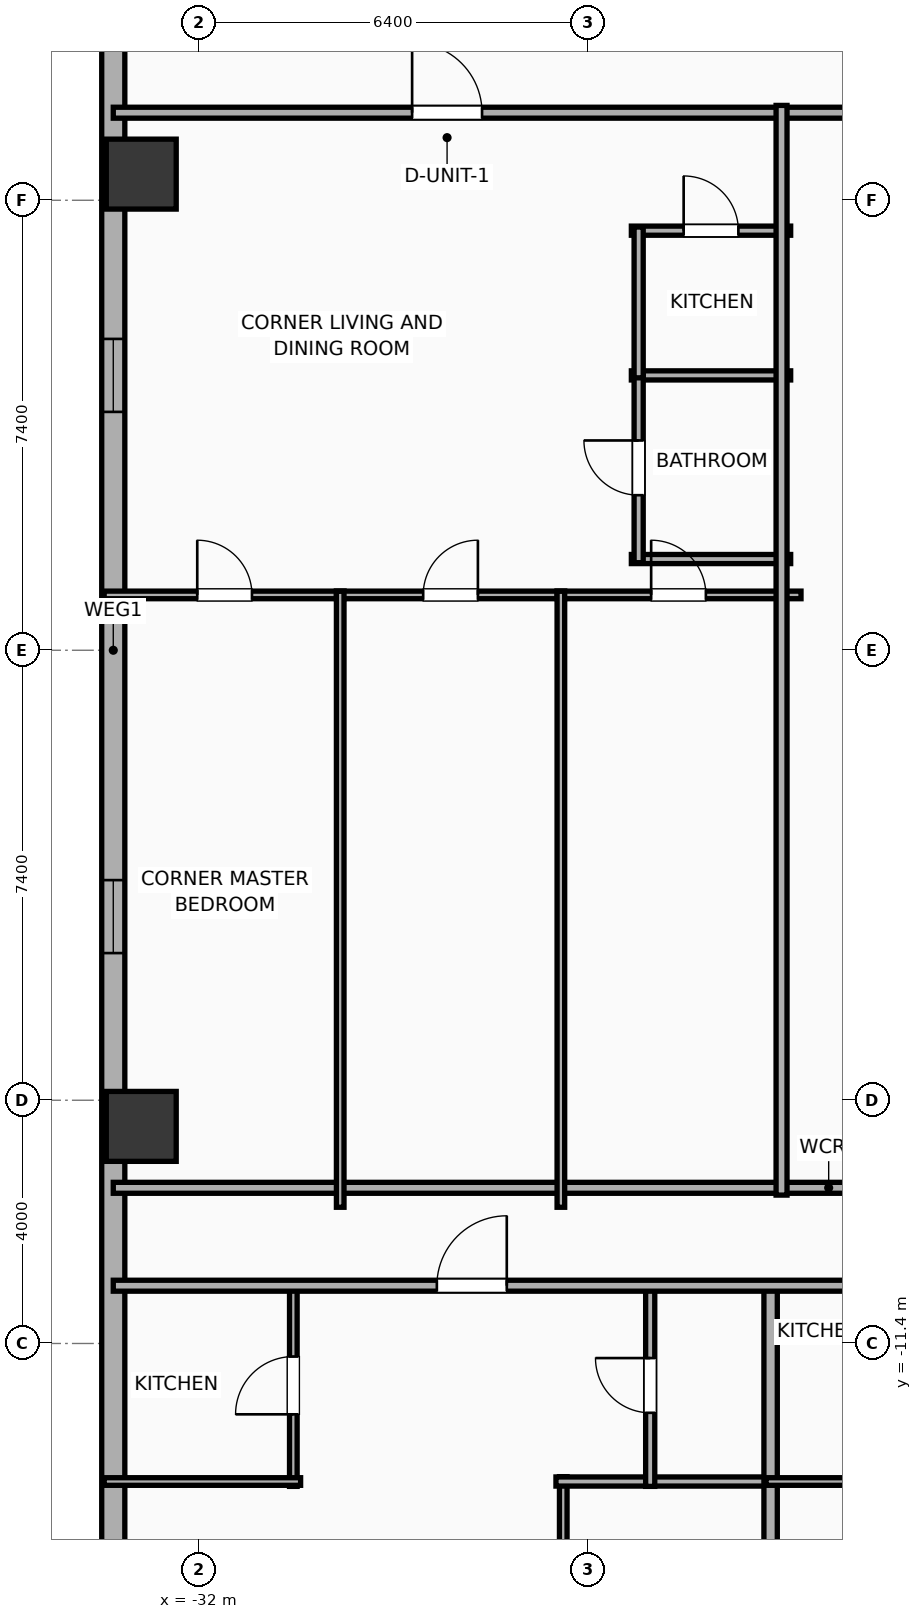
"""IFC4 building model, lengths in metres.
Left out: names, types, materials, properties, quantities, classifications, styles, units other than length and angle.
Written with IfcOpenShell. Run it as: python <this file> out.ifc"""

import sys

from ifc_helpers import new_model, si_unit, direction, frame, frame_2d, origin, origin_2d, place, context, subcontext, project, spatial, rectangle, hollow_rectangle, extrude, element, fill, save


model = new_model("IFC4")
c1 = context("Model", 3, precision=1e-05, world=origin(), true_north=direction((0.0, 1.0)))
c2 = subcontext(c1, "Body", "Model", "MODEL_VIEW")
j1 = project(units=[si_unit("LENGTHUNIT", "METRE"), si_unit("PLANEANGLEUNIT", "RADIAN")], contexts=[c1])
p1 = place(None, origin())
s1 = spatial("IfcSite", under=j1, at=p1, CompositionType="ELEMENT")
p2 = place(p1, origin())
s2 = spatial("IfcBuilding", under=s1, at=p2, CompositionType="ELEMENT")
p3 = place(p2, frame((0.0, 0.0, 57.2)))
s3 = spatial("IfcBuildingStorey", under=s2, at=p3, CompositionType="ELEMENT", Elevation=57.2)
for number, where, z_axis, x_axis in (
    (1, (-32.95, 7.83, 0.0), (0.0, 0.0, 1.0), (1.0, 0.0, 0.0)),
    (2, (-32.95, -7.83, 0.0), (0.0, 0.0, 1.0), (1.0, 0.0, 0.0)),
):
    element("IfcColumn", number, at=place(p3, frame(where, z_axis=z_axis, x_axis=x_axis)), inside=s3, PredefinedType="COLUMN", context=c2, shape_type="SweptSolid", body=[
        extrude(hollow_rectangle(XDim=1.15, YDim=1.15, WallThickness=0.04, at=origin_2d()), origin(), (0.0, 0.0, 1.0), 3.9),
    ])
p4 = place(p3, frame((-33.41, -18.381, 0.0), z_axis=(0.0, 0.0, 1.0), x_axis=(0.0, 1.0, 0.0)))
e3 = element("IfcWall", 3, at=p4, inside=s3, PredefinedType="ELEMENTEDWALL", context=c2, shape_type="SweptSolid", body=[
    extrude(rectangle(XDim=36.763, YDim=0.38, at=frame_2d((18.381, 0.0))), origin(), (0.0, 0.0, 1.0), 3.65),
])
p5 = place(p4, frame((33.362, 0.0, 0.75)))
e4 = element("IfcOpeningElement", 4, at=p5, cuts=e3, PredefinedType="OPENING", context=c2, shape_type="SweptSolid", body=[
    extrude(rectangle(XDim=1.2, YDim=2.05, at=frame_2d((0.6, 1.025))), frame((0.0, 0.2, 0.0), z_axis=(0.0, -1.0, 0.0), x_axis=(1.0, 0.0, 0.0)), (0.0, 0.0, 1.0), 0.4),
])
p6 = place(p4, frame((22.301, 0.0, 0.75)))
e5 = element("IfcOpeningElement", 5, at=p6, cuts=e3, PredefinedType="OPENING", context=c2, shape_type="SweptSolid", body=[
    extrude(rectangle(XDim=1.2, YDim=2.05, at=frame_2d((0.6, 1.025))), frame((0.0, 0.2, 0.0), z_axis=(0.0, -1.0, 0.0), x_axis=(1.0, 0.0, 0.0)), (0.0, 0.0, 1.0), 0.4),
])
p7 = place(p4, frame((13.401, 0.0, 0.75)))
e6 = element("IfcOpeningElement", 6, at=p7, cuts=e3, PredefinedType="OPENING", context=c2, shape_type="SweptSolid", body=[
    extrude(rectangle(XDim=1.2, YDim=2.05, at=frame_2d((0.6, 1.025))), frame((0.0, 0.2, 0.0), z_axis=(0.0, -1.0, 0.0), x_axis=(1.0, 0.0, 0.0)), (0.0, 0.0, 1.0), 0.4),
])
p8 = place(p3, frame((-33.41, 8.84, 0.0), z_axis=(0.0, 0.0, 1.0), x_axis=(1.0, 0.0, 0.0)))
e7 = element("IfcWall", 7, at=p8, inside=s3, PredefinedType="PARTITIONING", context=c2, shape_type="SweptSolid", body=[
    extrude(rectangle(XDim=23.53, YDim=0.18, at=frame_2d((11.765, 0.0))), origin(), (0.0, 0.0, 1.0), 3.65),
])
p9 = place(p8, frame((4.915, 0.0, 0.0)))
e8 = element("IfcOpeningElement", 8, at=p9, cuts=e7, PredefinedType="OPENING", context=c2, shape_type="SweptSolid", body=[
    extrude(rectangle(XDim=1.15, YDim=2.05, at=frame_2d((0.575, 1.025))), frame((0.0, 0.1, 0.0), z_axis=(0.0, -1.0, 0.0), x_axis=(1.0, 0.0, 0.0)), (0.0, 0.0, 1.0), 0.2),
])
p10 = place(p3, frame((-33.41, -8.84, 0.0), z_axis=(0.0, 0.0, 1.0), x_axis=(1.0, 0.0, 0.0)))
e9 = element("IfcWall", 9, at=p10, inside=s3, PredefinedType="PARTITIONING", context=c2, shape_type="SweptSolid", body=[
    extrude(rectangle(XDim=23.53, YDim=0.18, at=frame_2d((11.765, 0.0))), origin(), (0.0, 0.0, 1.0), 3.65),
])
p11 = place(p3, frame((-26.01, -22.36, 0.0), z_axis=(0.0, 0.0, 1.0), x_axis=(0.0, 1.0, 0.0)))
e10 = element("IfcWall", 10, at=p11, inside=s3, PredefinedType="PARTITIONING", context=c2, shape_type="SweptSolid", body=[
    extrude(rectangle(XDim=8.77, YDim=0.125, at=frame_2d((4.385, 0.0))), origin(), (0.0, 0.0, 1.0), 3.65),
])
p12 = place(p11, frame((6.215, 0.0, 0.0)))
e11 = element("IfcOpeningElement", 11, at=p12, cuts=e10, PredefinedType="OPENING", context=c2, shape_type="SweptSolid", body=[
    extrude(rectangle(XDim=0.9, YDim=2.05, at=frame_2d((0.45, 1.025))), frame((0.0, 0.073, 0.0), z_axis=(0.0, -1.0, 0.0), x_axis=(1.0, 0.0, 0.0)), (0.0, 0.0, 1.0), 0.145),
])
p13 = place(p3, frame((-26.13, -13.67, 0.0), z_axis=(0.0, 0.0, 1.0), x_axis=(1.0, 0.0, 0.0)))
e12 = element("IfcWall", 12, at=p13, inside=s3, PredefinedType="PLUMBINGWALL", context=c2, shape_type="SweptSolid", body=[
    extrude(rectangle(XDim=3.605, YDim=0.15, at=frame_2d((1.802, 0.0))), origin(), (0.0, 0.0, 1.0), 3.65),
])
p14 = place(p3, frame((-30.449, -13.75, 0.0), z_axis=(0.0, 0.0, 1.0), x_axis=(0.0, 1.0, 0.0)))
e13 = element("IfcWall", 13, at=p14, inside=s3, PredefinedType="PARTITIONING", context=c2, shape_type="SweptSolid", body=[
    extrude(rectangle(XDim=3.32, YDim=0.125, at=frame_2d((1.66, 0.0))), origin(), (0.0, 0.0, 1.0), 3.65),
])
p15 = place(p14, frame((1.185, 0.0, 0.0)))
e14 = element("IfcOpeningElement", 14, at=p15, cuts=e13, PredefinedType="OPENING", context=c2, shape_type="SweptSolid", body=[
    extrude(rectangle(XDim=0.95, YDim=2.05, at=frame_2d((0.475, 1.025))), frame((0.0, 0.073, 0.0), z_axis=(0.0, -1.0, 0.0), x_axis=(1.0, 0.0, 0.0)), (0.0, 0.0, 1.0), 0.145),
])
p16 = place(p3, frame((-33.56, -13.67, 0.0), z_axis=(0.0, 0.0, 1.0), x_axis=(1.0, 0.0, 0.0)))
e15 = element("IfcWall", 15, at=p16, inside=s3, PredefinedType="PARTITIONING", context=c2, shape_type="SweptSolid", body=[
    extrude(rectangle(XDim=3.231, YDim=0.125, at=frame_2d((1.615, 0.0))), origin(), (0.0, 0.0, 1.0), 3.65),
])
p17 = place(p3, frame((-24.58, -13.75, 0.0), z_axis=(0.0, 0.0, 1.0), x_axis=(0.0, 1.0, 0.0)))
e16 = element("IfcWall", 16, at=p17, inside=s3, PredefinedType="PLUMBINGWALL", context=c2, shape_type="SweptSolid", body=[
    extrude(rectangle(XDim=3.32, YDim=0.15, at=frame_2d((1.66, 0.0))), origin(), (0.0, 0.0, 1.0), 3.65),
])
p18 = place(p17, frame((1.21, 0.0, 0.0)))
e17 = element("IfcOpeningElement", 17, at=p18, cuts=e16, PredefinedType="OPENING", context=c2, shape_type="SweptSolid", body=[
    extrude(rectangle(XDim=0.9, YDim=2.05, at=frame_2d((0.45, 1.025))), frame((0.0, 0.085, 0.0), z_axis=(0.0, -1.0, 0.0), x_axis=(1.0, 0.0, 0.0)), (0.0, 0.0, 1.0), 0.17),
])
p19 = place(p3, frame((-22.6, -22.21, 0.0), z_axis=(0.0, 0.0, 1.0), x_axis=(0.0, 1.0, 0.0)))
e18 = element("IfcWall", 18, at=p19, inside=s3, PredefinedType="PARTITIONING", context=c2, shape_type="SweptSolid", body=[
    extrude(rectangle(XDim=11.84, YDim=0.22, at=frame_2d((5.92, 0.0))), origin(), (0.0, 0.0, 1.0), 3.65),
])
p20 = place(p3, frame((-22.675, -13.67, 0.0), z_axis=(0.0, 0.0, 1.0), x_axis=(1.0, 0.0, 0.0)))
e19 = element("IfcWall", 19, at=p20, inside=s3, PredefinedType="PARTITIONING", context=c2, shape_type="SweptSolid", body=[
    extrude(rectangle(XDim=2.505, YDim=0.125, at=frame_2d((1.252, 0.0))), origin(), (0.0, 0.0, 1.0), 3.65),
])
p21 = place(p3, frame((-33.41, -10.45, 0.0), z_axis=(0.0, 0.0, 1.0), x_axis=(1.0, 0.0, 0.0)))
e20 = element("IfcWall", 20, at=p21, inside=s3, PredefinedType="PARTITIONING", context=c2, shape_type="SweptSolid", body=[
    extrude(rectangle(XDim=59.62, YDim=0.18, at=frame_2d((29.81, 0.0))), origin(), (0.0, 0.0, 1.0), 3.65),
])
p22 = place(p21, frame((5.321, 0.0, 0.0)))
e21 = element("IfcOpeningElement", 21, at=p22, cuts=e20, PredefinedType="OPENING", context=c2, shape_type="SweptSolid", body=[
    extrude(rectangle(XDim=1.15, YDim=2.05, at=frame_2d((0.575, 1.025))), frame((0.0, 0.1, 0.0), z_axis=(0.0, -1.0, 0.0), x_axis=(1.0, 0.0, 0.0)), (0.0, 0.0, 1.0), 0.2),
])
p23 = place(p21, frame((14.3, 0.0, 0.0)))
e22 = element("IfcOpeningElement", 22, at=p23, cuts=e20, PredefinedType="OPENING", context=c2, shape_type="SweptSolid", body=[
    extrude(rectangle(XDim=1.15, YDim=2.05, at=frame_2d((0.575, 1.025))), frame((0.0, 0.1, 0.0), z_axis=(0.0, -1.0, 0.0), x_axis=(1.0, 0.0, 0.0)), (0.0, 0.0, 1.0), 0.2),
])
p24 = place(p21, frame((22.265, 0.0, 0.0)))
e23 = element("IfcOpeningElement", 23, at=p24, cuts=e20, PredefinedType="OPENING", context=c2, shape_type="SweptSolid", body=[
    extrude(rectangle(XDim=0.9, YDim=2.05, at=frame_2d((0.45, 1.025))), frame((0.0, 0.1, 0.0), z_axis=(0.0, -1.0, 0.0), x_axis=(1.0, 0.0, 0.0)), (0.0, 0.0, 1.0), 0.2),
])
p25 = place(p21, frame((29.903, 0.0, 0.0)))
e24 = element("IfcOpeningElement", 24, at=p25, cuts=e20, PredefinedType="OPENING", context=c2, shape_type="SweptSolid", body=[
    extrude(rectangle(XDim=1.15, YDim=2.05, at=frame_2d((0.575, 1.025))), frame((0.0, 0.1, 0.0), z_axis=(0.0, -1.0, 0.0), x_axis=(1.0, 0.0, 0.0)), (0.0, 0.0, 1.0), 0.2),
])
p26 = place(p21, frame((37.701, 0.0, 0.0)))
e25 = element("IfcOpeningElement", 25, at=p26, cuts=e20, PredefinedType="OPENING", context=c2, shape_type="SweptSolid", body=[
    extrude(rectangle(XDim=1.15, YDim=2.05, at=frame_2d((0.575, 1.025))), frame((0.0, 0.1, 0.0), z_axis=(0.0, -1.0, 0.0), x_axis=(1.0, 0.0, 0.0)), (0.0, 0.0, 1.0), 0.2),
])
p27 = place(p21, frame((45.654, 0.0, 0.0)))
e26 = element("IfcOpeningElement", 26, at=p27, cuts=e20, PredefinedType="OPENING", context=c2, shape_type="SweptSolid", body=[
    extrude(rectangle(XDim=0.9, YDim=2.05, at=frame_2d((0.45, 1.025))), frame((0.0, 0.1, 0.0), z_axis=(0.0, -1.0, 0.0), x_axis=(1.0, 0.0, 0.0)), (0.0, 0.0, 1.0), 0.2),
])
p28 = place(p21, frame((54.472, 0.0, 0.0)))
e27 = element("IfcOpeningElement", 27, at=p28, cuts=e20, PredefinedType="OPENING", context=c2, shape_type="SweptSolid", body=[
    extrude(rectangle(XDim=1.15, YDim=2.05, at=frame_2d((0.575, 1.025))), frame((0.0, 0.1, 0.0), z_axis=(0.0, -1.0, 0.0), x_axis=(1.0, 0.0, 0.0)), (0.0, 0.0, 1.0), 0.2),
])
p29 = place(p3, frame((-24.89, 6.9, 0.0), z_axis=(0.0, 0.0, 1.0), x_axis=(1.0, 0.0, 0.0)))
e28 = element("IfcWall", 28, at=p29, inside=s3, PredefinedType="PLUMBINGWALL", context=c2, shape_type="SweptSolid", body=[
    extrude(rectangle(XDim=2.62, YDim=0.15, at=frame_2d((1.31, 0.0))), origin(), (0.0, 0.0, 1.0), 3.65),
])
p30 = place(p29, frame((0.86, 0.0, 0.0)))
e29 = element("IfcOpeningElement", 29, at=p30, cuts=e28, PredefinedType="OPENING", context=c2, shape_type="SweptSolid", body=[
    extrude(rectangle(XDim=0.9, YDim=2.05, at=frame_2d((0.45, 1.025))), frame((0.0, 0.085, 0.0), z_axis=(0.0, -1.0, 0.0), x_axis=(1.0, 0.0, 0.0)), (0.0, 0.0, 1.0), 0.17),
])
for number, where, z_axis, x_axis in (
    (30, (-24.89, 4.52, 0.0), (0.0, 0.0, 1.0), (1.0, 0.0, 0.0)),
    (31, (-24.89, 1.5, 0.0), (0.0, 0.0, 1.0), (1.0, 0.0, 0.0)),
):
    element("IfcWall", number, at=place(p3, frame(where, z_axis=z_axis, x_axis=x_axis)), inside=s3, PredefinedType="PLUMBINGWALL", context=c2, shape_type="SweptSolid", body=[
        extrude(rectangle(XDim=2.62, YDim=0.15, at=frame_2d((1.31, 0.0))), origin(), (0.0, 0.0, 1.0), 3.65),
    ])
p31 = place(p3, frame((-24.77, 1.44, 0.0), z_axis=(0.0, 0.0, 1.0), x_axis=(0.0, 1.0, 0.0)))
e32 = element("IfcWall", 32, at=p31, inside=s3, PredefinedType="PLUMBINGWALL", context=c2, shape_type="SweptSolid", body=[
    extrude(rectangle(XDim=3.12, YDim=0.15, at=frame_2d((1.56, 0.0))), origin(), (0.0, 0.0, 1.0), 3.65),
])
p32 = place(p31, frame((1.11, 0.0, 0.0)))
e33 = element("IfcOpeningElement", 33, at=p32, cuts=e32, PredefinedType="OPENING", context=c2, shape_type="SweptSolid", body=[
    extrude(rectangle(XDim=0.9, YDim=2.05, at=frame_2d((0.45, 1.025))), frame((0.0, 0.085, 0.0), z_axis=(0.0, -1.0, 0.0), x_axis=(1.0, 0.0, 0.0)), (0.0, 0.0, 1.0), 0.17),
])
p33 = place(p3, frame((-24.77, 4.48, 0.0), z_axis=(0.0, 0.0, 1.0), x_axis=(0.0, 1.0, 0.0)))
e34 = element("IfcWall", 34, at=p33, inside=s3, PredefinedType="PLUMBINGWALL", context=c2, shape_type="SweptSolid", body=[
    extrude(rectangle(XDim=2.48, YDim=0.15, at=frame_2d((1.24, 0.0))), origin(), (0.0, 0.0, 1.0), 3.65),
])
p34 = place(p3, frame((-33.56, 0.91, 0.0), z_axis=(0.0, 0.0, 1.0), x_axis=(1.0, 0.0, 0.0)))
e35 = element("IfcWall", 35, at=p34, inside=s3, PredefinedType="PARTITIONING", context=c2, shape_type="SweptSolid", body=[
    extrude(rectangle(XDim=3.945, YDim=0.125, at=frame_2d((1.972, 0.0))), origin(), (0.0, 0.0, 1.0), 3.65),
])
p35 = place(p34, frame((1.531, 0.0, 0.0)))
e36 = element("IfcOpeningElement", 36, at=p35, cuts=e35, PredefinedType="OPENING", context=c2, shape_type="SweptSolid", body=[
    extrude(rectangle(XDim=0.9, YDim=2.05, at=frame_2d((0.45, 1.025))), frame((0.0, 0.073, 0.0), z_axis=(0.0, -1.0, 0.0), x_axis=(1.0, 0.0, 0.0)), (0.0, 0.0, 1.0), 0.145),
])
p36 = place(p3, frame((-29.74, 0.91, 0.0), z_axis=(0.0, 0.0, 1.0), x_axis=(1.0, 0.0, 0.0)))
e37 = element("IfcWall", 37, at=p36, inside=s3, PredefinedType="PARTITIONING", context=c2, shape_type="SweptSolid", body=[
    extrude(rectangle(XDim=3.754, YDim=0.125, at=frame_2d((1.877, 0.0))), origin(), (0.0, 0.0, 1.0), 3.65),
])
p37 = place(p36, frame((1.427, 0.0, 0.0)))
e38 = element("IfcOpeningElement", 38, at=p37, cuts=e37, PredefinedType="OPENING", context=c2, shape_type="SweptSolid", body=[
    extrude(rectangle(XDim=0.9, YDim=2.05, at=frame_2d((0.45, 1.025))), frame((0.0, 0.073, 0.0), z_axis=(0.0, -1.0, 0.0), x_axis=(1.0, 0.0, 0.0)), (0.0, 0.0, 1.0), 0.145),
])
p38 = place(p3, frame((-26.112, 0.91, 0.0), z_axis=(0.0, 0.0, 1.0), x_axis=(1.0, 0.0, 0.0)))
e39 = element("IfcWall", 39, at=p38, inside=s3, PredefinedType="PARTITIONING", context=c2, shape_type="SweptSolid", body=[
    extrude(rectangle(XDim=4.011, YDim=0.125, at=frame_2d((2.006, 0.0))), origin(), (0.0, 0.0, 1.0), 3.65),
])
p39 = place(p38, frame((1.547, 0.0, 0.0)))
e40 = element("IfcOpeningElement", 40, at=p39, cuts=e39, PredefinedType="OPENING", context=c2, shape_type="SweptSolid", body=[
    extrude(rectangle(XDim=0.9, YDim=2.05, at=frame_2d((0.45, 1.025))), frame((0.0, 0.073, 0.0), z_axis=(0.0, -1.0, 0.0), x_axis=(1.0, 0.0, 0.0)), (0.0, 0.0, 1.0), 0.145),
])
for number, where, z_axis, x_axis in (
    (41, (-26.049, -9.16, 0.0), (0.0, 0.0, 1.0), (0.0, 1.0, 0.0)),
    (42, (-29.678, -9.16, 0.0), (0.0, 0.0, 1.0), (0.0, 1.0, 0.0)),
):
    element("IfcWall", number, at=place(p3, frame(where, z_axis=z_axis, x_axis=x_axis)), inside=s3, PredefinedType="PARTITIONING", context=c2, shape_type="SweptSolid", body=[
        extrude(rectangle(XDim=10.13, YDim=0.125, at=frame_2d((5.065, 0.0))), origin(), (0.0, 0.0, 1.0), 3.65),
    ])
p40 = place(p3, frame((-22.42, -8.96, 0.0), z_axis=(0.0, 0.0, 1.0), x_axis=(0.0, 1.0, 0.0)))
e43 = element("IfcWall", 43, at=p40, inside=s3, PredefinedType="PARTITIONING", context=c2, shape_type="SweptSolid", body=[
    extrude(rectangle(XDim=17.92, YDim=0.18, at=frame_2d((8.96, 0.0))), origin(), (0.0, 0.0, 1.0), 3.65),
])
p41 = place(p6, origin())
e44 = element("IfcWindow", 44, at=p41, inside=s3, PartitioningType="SINGLE_PANEL", PredefinedType="WINDOW", context=c2, shape_type="SweptSolid", body=[
    extrude(rectangle(XDim=1.2, YDim=2.05, at=frame_2d((0.6, 1.025))), frame((0.0, 0.03, 0.0), z_axis=(0.0, -1.0, 0.0), x_axis=(1.0, 0.0, 0.0)), (0.0, 0.0, 1.0), 0.06),
])
fill(e5, e44)
p42 = place(p7, origin())
e45 = element("IfcWindow", 45, at=p42, inside=s3, PartitioningType="SINGLE_PANEL", PredefinedType="WINDOW", context=c2, shape_type="SweptSolid", body=[
    extrude(rectangle(XDim=1.2, YDim=2.05, at=frame_2d((0.6, 1.025))), frame((0.0, 0.03, 0.0), z_axis=(0.0, -1.0, 0.0), x_axis=(1.0, 0.0, 0.0)), (0.0, 0.0, 1.0), 0.06),
])
fill(e6, e45)
p43 = place(p9, origin())
e46 = element("IfcDoor", 46, at=p43, inside=s3, OperationType="SINGLE_SWING_LEFT", PredefinedType="DOOR", context=c2, shape_type="SweptSolid", body=[
    extrude(rectangle(XDim=1.15, YDim=2.05, at=frame_2d((0.575, 1.025))), frame((0.0, 0.025, 0.0), z_axis=(0.0, -1.0, 0.0), x_axis=(1.0, 0.0, 0.0)), (0.0, 0.0, 1.0), 0.05),
])
fill(e8, e46)
p44 = place(p15, origin())
e47 = element("IfcDoor", 47, at=p44, inside=s3, OperationType="SINGLE_SWING_LEFT", PredefinedType="DOOR", context=c2, shape_type="SweptSolid", body=[
    extrude(rectangle(XDim=0.95, YDim=2.05, at=frame_2d((0.475, 1.025))), frame((0.0, 0.025, 0.0), z_axis=(0.0, -1.0, 0.0), x_axis=(1.0, 0.0, 0.0)), (0.0, 0.0, 1.0), 0.05),
])
fill(e14, e47)
p45 = place(p18, origin())
e48 = element("IfcDoor", 48, at=p45, inside=s3, OperationType="SINGLE_SWING_RIGHT", PredefinedType="DOOR", context=c2, shape_type="SweptSolid", body=[
    extrude(rectangle(XDim=0.9, YDim=2.05, at=frame_2d((0.45, 1.025))), frame((0.0, 0.025, 0.0), z_axis=(0.0, -1.0, 0.0), x_axis=(1.0, 0.0, 0.0)), (0.0, 0.0, 1.0), 0.05),
])
fill(e17, e48)
p46 = place(p22, origin())
e49 = element("IfcDoor", 49, at=p46, inside=s3, OperationType="SINGLE_SWING_RIGHT", PredefinedType="DOOR", context=c2, shape_type="SweptSolid", body=[
    extrude(rectangle(XDim=1.15, YDim=2.05, at=frame_2d((0.575, 1.025))), frame((0.0, 0.025, 0.0), z_axis=(0.0, -1.0, 0.0), x_axis=(1.0, 0.0, 0.0)), (0.0, 0.0, 1.0), 0.05),
])
fill(e21, e49)
p47 = place(p30, origin())
e50 = element("IfcDoor", 50, at=p47, inside=s3, OperationType="SINGLE_SWING_LEFT", PredefinedType="DOOR", context=c2, shape_type="SweptSolid", body=[
    extrude(rectangle(XDim=0.9, YDim=2.05, at=frame_2d((0.45, 1.025))), frame((0.0, 0.025, 0.0), z_axis=(0.0, -1.0, 0.0), x_axis=(1.0, 0.0, 0.0)), (0.0, 0.0, 1.0), 0.05),
])
fill(e29, e50)
p48 = place(p32, origin())
e51 = element("IfcDoor", 51, at=p48, inside=s3, OperationType="SINGLE_SWING_RIGHT", PredefinedType="DOOR", context=c2, shape_type="SweptSolid", body=[
    extrude(rectangle(XDim=0.9, YDim=2.05, at=frame_2d((0.45, 1.025))), frame((0.0, 0.025, 0.0), z_axis=(0.0, -1.0, 0.0), x_axis=(1.0, 0.0, 0.0)), (0.0, 0.0, 1.0), 0.05),
])
fill(e33, e51)
p49 = place(p35, origin())
e52 = element("IfcDoor", 52, at=p49, inside=s3, OperationType="SINGLE_SWING_LEFT", PredefinedType="DOOR", context=c2, shape_type="SweptSolid", body=[
    extrude(rectangle(XDim=0.9, YDim=2.05, at=frame_2d((0.45, 1.025))), frame((0.0, 0.025, 0.0), z_axis=(0.0, -1.0, 0.0), x_axis=(1.0, 0.0, 0.0)), (0.0, 0.0, 1.0), 0.05),
])
fill(e36, e52)
p50 = place(p37, origin())
e53 = element("IfcDoor", 53, at=p50, inside=s3, OperationType="SINGLE_SWING_RIGHT", PredefinedType="DOOR", context=c2, shape_type="SweptSolid", body=[
    extrude(rectangle(XDim=0.9, YDim=2.05, at=frame_2d((0.45, 1.025))), frame((0.0, 0.025, 0.0), z_axis=(0.0, -1.0, 0.0), x_axis=(1.0, 0.0, 0.0)), (0.0, 0.0, 1.0), 0.05),
])
fill(e38, e53)
p51 = place(p39, origin())
e54 = element("IfcDoor", 54, at=p51, inside=s3, OperationType="SINGLE_SWING_LEFT", PredefinedType="DOOR", context=c2, shape_type="SweptSolid", body=[
    extrude(rectangle(XDim=0.9, YDim=2.05, at=frame_2d((0.45, 1.025))), frame((0.0, 0.025, 0.0), z_axis=(0.0, -1.0, 0.0), x_axis=(1.0, 0.0, 0.0)), (0.0, 0.0, 1.0), 0.05),
])
fill(e40, e54)
save(model, sys.argv[1])
